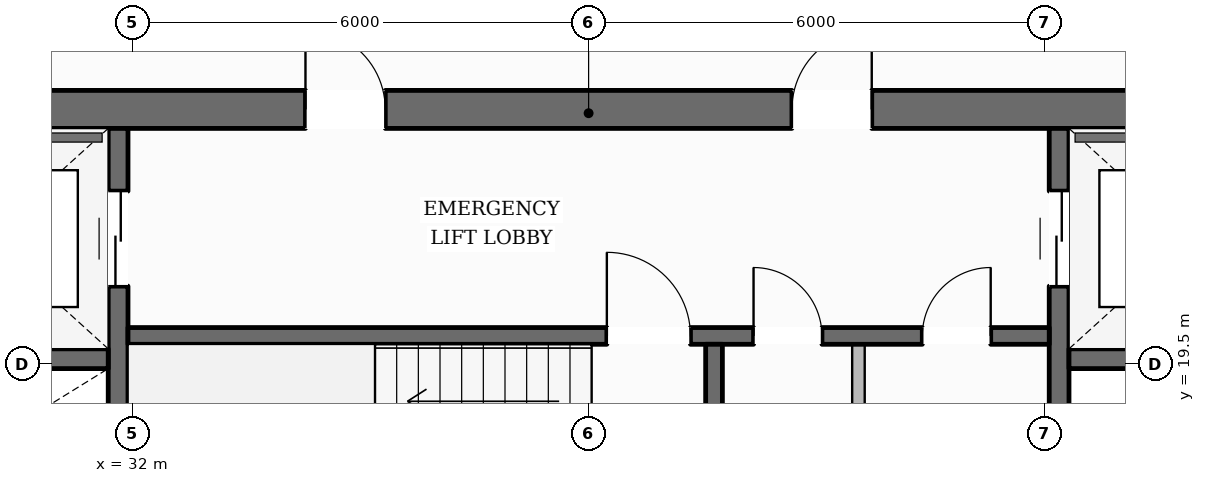
"""IFC4 building model, lengths in metres.
Left out: names, types, materials, properties, quantities, classifications, styles, units other than length and angle.
Written with IfcOpenShell. Run it as: python <this file> out.ifc"""

import sys

from ifc_helpers import new_model, si_unit, direction, frame, frame_2d, origin, place, context, subcontext, project, spatial, rectangle, extrude, element, fill, save


model = new_model("IFC4")
c1 = context("Model", 3, precision=1e-05, world=origin(), true_north=direction((0.0, 1.0)))
c2 = subcontext(c1, "Body", "Model", "MODEL_VIEW")
j1 = project(units=[si_unit("LENGTHUNIT", "METRE"), si_unit("PLANEANGLEUNIT", "RADIAN")], contexts=[c1])
p1 = place(None, origin())
s1 = spatial("IfcSite", under=j1, at=p1, CompositionType="ELEMENT")
p2 = place(p1, origin())
s2 = spatial("IfcBuilding", under=s1, at=p2, CompositionType="ELEMENT")
p3 = place(p2, frame((0.0, 0.0, 120.15)))
s3 = spatial("IfcBuildingStorey", under=s2, at=p3, CompositionType="ELEMENT", Elevation=120.15)
p4 = place(p3, frame((27.98, 22.85, 0.0), z_axis=(0.0, 0.0, 1.0), x_axis=(1.0, 0.0, 0.0)))
e1 = element("IfcWall", 1, at=p4, inside=s3, PredefinedType="SOLIDWALL", context=c2, shape_type="SweptSolid", body=[
    extrude(rectangle(XDim=20.04, YDim=0.5, at=frame_2d((10.02, 0.0))), origin(), (0.0, 0.0, 1.0), 3.6),
])
p5 = place(p4, frame((6.295, 0.0, 0.0)))
e2 = element("IfcOpeningElement", 2, at=p5, cuts=e1, PredefinedType="OPENING", context=c2, shape_type="SweptSolid", body=[
    extrude(rectangle(XDim=1.05, YDim=2.15, at=frame_2d((0.525, 1.075))), frame((0.0, 0.26, 0.0), z_axis=(0.0, -1.0, 0.0), x_axis=(1.0, 0.0, 0.0)), (0.0, 0.0, 1.0), 0.52),
])
p6 = place(p4, frame((12.695, 0.0, 0.0)))
e3 = element("IfcOpeningElement", 3, at=p6, cuts=e1, PredefinedType="OPENING", context=c2, shape_type="SweptSolid", body=[
    extrude(rectangle(XDim=1.05, YDim=2.15, at=frame_2d((0.525, 1.075))), frame((0.0, 0.26, 0.0), z_axis=(0.0, -1.0, 0.0), x_axis=(1.0, 0.0, 0.0)), (0.0, 0.0, 1.0), 0.52),
])
p7 = place(p3, frame((31.81, 9.6, 0.0), z_axis=(0.0, 0.0, 1.0), x_axis=(0.0, 1.0, 0.0)))
e4 = element("IfcWall", 4, at=p7, inside=s3, PredefinedType="SHEAR", context=c2, shape_type="SweptSolid", body=[
    extrude(rectangle(XDim=13.0, YDim=0.26, at=frame_2d((6.5, 0.0))), origin(), (0.0, 0.0, 1.0), 3.6),
])
p8 = place(p7, frame((10.925, 0.0, 0.0)))
e5 = element("IfcOpeningElement", 5, at=p8, cuts=e4, PredefinedType="OPENING", context=c2, shape_type="SweptSolid", body=[
    extrude(rectangle(XDim=1.25, YDim=2.25, at=frame_2d((0.625, 1.125))), frame((0.0, 0.14, 0.0), z_axis=(0.0, -1.0, 0.0), x_axis=(1.0, 0.0, 0.0)), (0.0, 0.0, 1.0), 0.28),
])
p9 = place(p3, frame((44.19, 9.6, 0.0), z_axis=(0.0, 0.0, 1.0), x_axis=(0.0, 1.0, 0.0)))
e6 = element("IfcWall", 6, at=p9, inside=s3, PredefinedType="SHEAR", context=c2, shape_type="SweptSolid", body=[
    extrude(rectangle(XDim=13.0, YDim=0.26, at=frame_2d((6.5, 0.0))), origin(), (0.0, 0.0, 1.0), 3.6),
])
p10 = place(p9, frame((10.925, 0.0, 0.0)))
e7 = element("IfcOpeningElement", 7, at=p10, cuts=e6, PredefinedType="OPENING", context=c2, shape_type="SweptSolid", body=[
    extrude(rectangle(XDim=1.25, YDim=2.25, at=frame_2d((0.625, 1.125))), frame((0.0, 0.14, 0.0), z_axis=(0.0, -1.0, 0.0), x_axis=(1.0, 0.0, 0.0)), (0.0, 0.0, 1.0), 0.28),
])
for number, where, z_axis, x_axis in (
    (8, (28.48, 19.57, 0.0), (0.0, 0.0, 1.0), (1.0, 0.0, 0.0)),
    (9, (44.32, 19.57, 0.0), (0.0, 0.0, 1.0), (1.0, 0.0, 0.0)),
):
    element("IfcWall", number, at=place(p3, frame(where, z_axis=z_axis, x_axis=x_axis)), inside=s3, PredefinedType="SHEAR", context=c2, shape_type="SweptSolid", body=[
        extrude(rectangle(XDim=3.2, YDim=0.26, at=frame_2d((1.6, 0.0))), origin(), (0.0, 0.0, 1.0), 3.6),
    ])
p11 = place(p3, frame((31.94, 19.87, 0.0), z_axis=(0.0, 0.0, 1.0), x_axis=(1.0, 0.0, 0.0)))
e10 = element("IfcWall", 10, at=p11, inside=s3, PredefinedType="SOLIDWALL", context=c2, shape_type="SweptSolid", body=[
    extrude(rectangle(XDim=12.12, YDim=0.22, at=frame_2d((6.06, 0.0))), origin(), (0.0, 0.0, 1.0), 3.6),
])
p12 = place(p11, frame((6.3, 0.0, 0.0)))
e11 = element("IfcOpeningElement", 11, at=p12, cuts=e10, PredefinedType="OPENING", context=c2, shape_type="SweptSolid", body=[
    extrude(rectangle(XDim=1.1, YDim=2.15, at=frame_2d((0.55, 1.075))), frame((0.0, 0.12, 0.0), z_axis=(0.0, -1.0, 0.0), x_axis=(1.0, 0.0, 0.0)), (0.0, 0.0, 1.0), 0.24),
])
p13 = place(p11, frame((8.23, 0.0, 0.0)))
e12 = element("IfcOpeningElement", 12, at=p13, cuts=e10, PredefinedType="OPENING", context=c2, shape_type="SweptSolid", body=[
    extrude(rectangle(XDim=0.9, YDim=2.1, at=frame_2d((0.45, 1.05))), frame((0.0, 0.12, 0.0), z_axis=(0.0, -1.0, 0.0), x_axis=(1.0, 0.0, 0.0)), (0.0, 0.0, 1.0), 0.24),
])
p14 = place(p11, frame((10.45, 0.0, 0.0)))
e13 = element("IfcOpeningElement", 13, at=p14, cuts=e10, PredefinedType="OPENING", context=c2, shape_type="SweptSolid", body=[
    extrude(rectangle(XDim=0.9, YDim=2.1, at=frame_2d((0.45, 1.05))), frame((0.0, 0.12, 0.0), z_axis=(0.0, -1.0, 0.0), x_axis=(1.0, 0.0, 0.0)), (0.0, 0.0, 1.0), 0.24),
])
p15 = place(p3, frame((39.65, 16.56, 0.0), z_axis=(0.0, 0.0, 1.0), x_axis=(0.0, 1.0, 0.0)))
e14 = element("IfcWall", 14, at=p15, inside=s3, PredefinedType="SOLIDWALL", context=c2, shape_type="SweptSolid", body=[
    extrude(rectangle(XDim=3.2, YDim=0.22, at=frame_2d((1.6, 0.0))), origin(), (0.0, 0.0, 1.0), 3.6),
])
p16 = place(p3, frame((13.966, 12.858, 0.0), z_axis=(0.0, 0.0, 1.0), x_axis=(0.499138995893, 0.86652193439, 0.0)))
e15 = element("IfcWall", 15, at=p16, inside=s3, PredefinedType="STANDARD", context=c2, shape_type="SweptSolid", body=[
    extrude(rectangle(XDim=36.509, YDim=0.38, at=frame_2d((18.255, 0.0))), origin(), (0.0, 0.0, 1.0), 3.059),
])
p17 = place(p16, frame((8.727, 0.0, 0.0)))
e16 = element("IfcOpeningElement", 16, at=p17, cuts=e15, PredefinedType="OPENING", context=c2, shape_type="SweptSolid", body=[
    extrude(rectangle(XDim=1.0, YDim=2.2, at=frame_2d((0.5, 1.1))), frame((0.0, 0.2, 0.0), z_axis=(0.0, -1.0, 0.0), x_axis=(1.0, 0.0, 0.0)), (0.0, 0.0, 1.0), 0.4),
])
p18 = place(p16, frame((32.292, 0.0, 0.65)))
e17 = element("IfcOpeningElement", 17, at=p18, cuts=e15, PredefinedType="OPENING", context=c2, shape_type="SweptSolid", body=[
    extrude(rectangle(XDim=1.55, YDim=1.75, at=frame_2d((0.775, 0.875))), frame((0.0, 0.2, 0.0), z_axis=(0.0, -1.0, 0.0), x_axis=(1.0, 0.0, 0.0)), (0.0, 0.0, 1.0), 0.4),
])
p19 = place(p16, frame((26.367, 0.0, 0.65)))
e18 = element("IfcOpeningElement", 18, at=p19, cuts=e15, PredefinedType="OPENING", context=c2, shape_type="SweptSolid", body=[
    extrude(rectangle(XDim=1.55, YDim=1.75, at=frame_2d((0.775, 0.875))), frame((0.0, 0.2, 0.0), z_axis=(0.0, -1.0, 0.0), x_axis=(1.0, 0.0, 0.0)), (0.0, 0.0, 1.0), 0.4),
])
p20 = place(p16, frame((20.442, 0.0, 0.65)))
e19 = element("IfcOpeningElement", 19, at=p20, cuts=e15, PredefinedType="OPENING", context=c2, shape_type="SweptSolid", body=[
    extrude(rectangle(XDim=1.55, YDim=1.75, at=frame_2d((0.775, 0.875))), frame((0.0, 0.2, 0.0), z_axis=(0.0, -1.0, 0.0), x_axis=(1.0, 0.0, 0.0)), (0.0, 0.0, 1.0), 0.4),
])
p21 = place(p16, frame((2.666, 0.0, 0.65)))
e20 = element("IfcOpeningElement", 20, at=p21, cuts=e15, PredefinedType="OPENING", context=c2, shape_type="SweptSolid", body=[
    extrude(rectangle(XDim=1.55, YDim=1.75, at=frame_2d((0.775, 0.875))), frame((0.0, 0.2, 0.0), z_axis=(0.0, -1.0, 0.0), x_axis=(1.0, 0.0, 0.0)), (0.0, 0.0, 1.0), 0.4),
])
p22 = place(p3, frame((43.959, 44.406, 0.0), z_axis=(0.0, 0.0, 1.0), x_axis=(0.50514079069, -0.863036952616, 0.0)))
e21 = element("IfcWall", 21, at=p22, inside=s3, PredefinedType="STANDARD", context=c2, shape_type="SweptSolid", body=[
    extrude(rectangle(XDim=36.948, YDim=0.38, at=frame_2d((18.474, 0.0))), origin(), (0.0, 0.0, 1.0), 3.059),
])
p23 = place(p22, frame((32.695, 0.0, 0.65)))
e22 = element("IfcOpeningElement", 22, at=p23, cuts=e21, PredefinedType="OPENING", context=c2, shape_type="SweptSolid", body=[
    extrude(rectangle(XDim=1.55, YDim=1.75, at=frame_2d((0.775, 0.875))), frame((0.0, 0.2, 0.0), z_axis=(0.0, -1.0, 0.0), x_axis=(1.0, 0.0, 0.0)), (0.0, 0.0, 1.0), 0.4),
])
p24 = place(p22, frame((26.696, 0.0, 0.65)))
e23 = element("IfcOpeningElement", 23, at=p24, cuts=e21, PredefinedType="OPENING", context=c2, shape_type="SweptSolid", body=[
    extrude(rectangle(XDim=1.55, YDim=1.75, at=frame_2d((0.775, 0.875))), frame((0.0, 0.2, 0.0), z_axis=(0.0, -1.0, 0.0), x_axis=(1.0, 0.0, 0.0)), (0.0, 0.0, 1.0), 0.4),
])
p25 = place(p22, frame((20.696, 0.0, 0.65)))
e24 = element("IfcOpeningElement", 24, at=p25, cuts=e21, PredefinedType="OPENING", context=c2, shape_type="SweptSolid", body=[
    extrude(rectangle(XDim=1.55, YDim=1.75, at=frame_2d((0.775, 0.875))), frame((0.0, 0.2, 0.0), z_axis=(0.0, -1.0, 0.0), x_axis=(1.0, 0.0, 0.0)), (0.0, 0.0, 1.0), 0.4),
])
p26 = place(p22, frame((8.697, 0.0, 0.65)))
e25 = element("IfcOpeningElement", 25, at=p26, cuts=e21, PredefinedType="OPENING", context=c2, shape_type="SweptSolid", body=[
    extrude(rectangle(XDim=1.55, YDim=1.75, at=frame_2d((0.775, 0.875))), frame((0.0, 0.2, 0.0), z_axis=(0.0, -1.0, 0.0), x_axis=(1.0, 0.0, 0.0)), (0.0, 0.0, 1.0), 0.4),
])
p27 = place(p22, frame((2.698, 0.0, 0.65)))
e26 = element("IfcOpeningElement", 26, at=p27, cuts=e21, PredefinedType="OPENING", context=c2, shape_type="SweptSolid", body=[
    extrude(rectangle(XDim=1.55, YDim=1.75, at=frame_2d((0.775, 0.875))), frame((0.0, 0.2, 0.0), z_axis=(0.0, -1.0, 0.0), x_axis=(1.0, 0.0, 0.0)), (0.0, 0.0, 1.0), 0.4),
])
p28 = place(p3, frame((41.55, 16.56, 0.0), z_axis=(0.0, 0.0, 1.0), x_axis=(0.0, 1.0, 0.0)))
e27 = element("IfcWall", 27, at=p28, inside=s3, PredefinedType="PARTITIONING", context=c2, shape_type="SweptSolid", body=[
    extrude(rectangle(XDim=3.2, YDim=0.165, at=frame_2d((1.6, 0.0))), origin(), (0.0, 0.0, 1.0), 3.6),
])
p29 = place(p12, origin())
e28 = element("IfcDoor", 28, at=p29, inside=s3, OperationType="SINGLE_SWING_LEFT", PredefinedType="DOOR", context=c2, shape_type="SweptSolid", body=[
    extrude(rectangle(XDim=1.1, YDim=2.15, at=frame_2d((0.55, 1.075))), frame((0.0, 0.025, 0.0), z_axis=(0.0, -1.0, 0.0), x_axis=(1.0, 0.0, 0.0)), (0.0, 0.0, 1.0), 0.05),
])
fill(e11, e28)
p30 = place(p5, origin())
e29 = element("IfcDoor", 29, at=p30, inside=s3, OperationType="SINGLE_SWING_LEFT", PredefinedType="DOOR", context=c2, shape_type="SweptSolid", body=[
    extrude(rectangle(XDim=1.05, YDim=2.15, at=frame_2d((0.525, 1.075))), frame((0.0, 0.025, 0.0), z_axis=(0.0, -1.0, 0.0), x_axis=(1.0, 0.0, 0.0)), (0.0, 0.0, 1.0), 0.05),
])
fill(e2, e29)
p31 = place(p6, origin())
e30 = element("IfcDoor", 30, at=p31, inside=s3, OperationType="SINGLE_SWING_RIGHT", PredefinedType="DOOR", context=c2, shape_type="SweptSolid", body=[
    extrude(rectangle(XDim=1.05, YDim=2.15, at=frame_2d((0.525, 1.075))), frame((0.0, 0.025, 0.0), z_axis=(0.0, -1.0, 0.0), x_axis=(1.0, 0.0, 0.0)), (0.0, 0.0, 1.0), 0.05),
])
fill(e3, e30)
p32 = place(p8, origin())
e31 = element("IfcDoor", 31, at=p32, inside=s3, OperationType="DOUBLE_DOOR_SLIDING", PredefinedType="DOOR", context=c2, shape_type="SweptSolid", body=[
    extrude(rectangle(XDim=1.25, YDim=2.25, at=frame_2d((0.625, 1.125))), frame((0.0, 0.025, 0.0), z_axis=(0.0, -1.0, 0.0), x_axis=(1.0, 0.0, 0.0)), (0.0, 0.0, 1.0), 0.05),
])
fill(e5, e31)
p33 = place(p10, origin())
e32 = element("IfcDoor", 32, at=p33, inside=s3, OperationType="DOUBLE_DOOR_SLIDING", PredefinedType="DOOR", context=c2, shape_type="SweptSolid", body=[
    extrude(rectangle(XDim=1.25, YDim=2.25, at=frame_2d((0.625, 1.125))), frame((0.0, 0.025, 0.0), z_axis=(0.0, -1.0, 0.0), x_axis=(1.0, 0.0, 0.0)), (0.0, 0.0, 1.0), 0.05),
])
fill(e7, e32)
p34 = place(p13, origin())
e33 = element("IfcDoor", 33, at=p34, inside=s3, OperationType="SINGLE_SWING_LEFT", PredefinedType="DOOR", context=c2, shape_type="SweptSolid", body=[
    extrude(rectangle(XDim=0.9, YDim=2.1, at=frame_2d((0.45, 1.05))), frame((0.0, 0.025, 0.0), z_axis=(0.0, -1.0, 0.0), x_axis=(1.0, 0.0, 0.0)), (0.0, 0.0, 1.0), 0.05),
])
fill(e12, e33)
p35 = place(p14, origin())
e34 = element("IfcDoor", 34, at=p35, inside=s3, OperationType="SINGLE_SWING_RIGHT", PredefinedType="DOOR", context=c2, shape_type="SweptSolid", body=[
    extrude(rectangle(XDim=0.9, YDim=2.1, at=frame_2d((0.45, 1.05))), frame((0.0, 0.025, 0.0), z_axis=(0.0, -1.0, 0.0), x_axis=(1.0, 0.0, 0.0)), (0.0, 0.0, 1.0), 0.05),
])
fill(e13, e34)
save(model, sys.argv[1])
